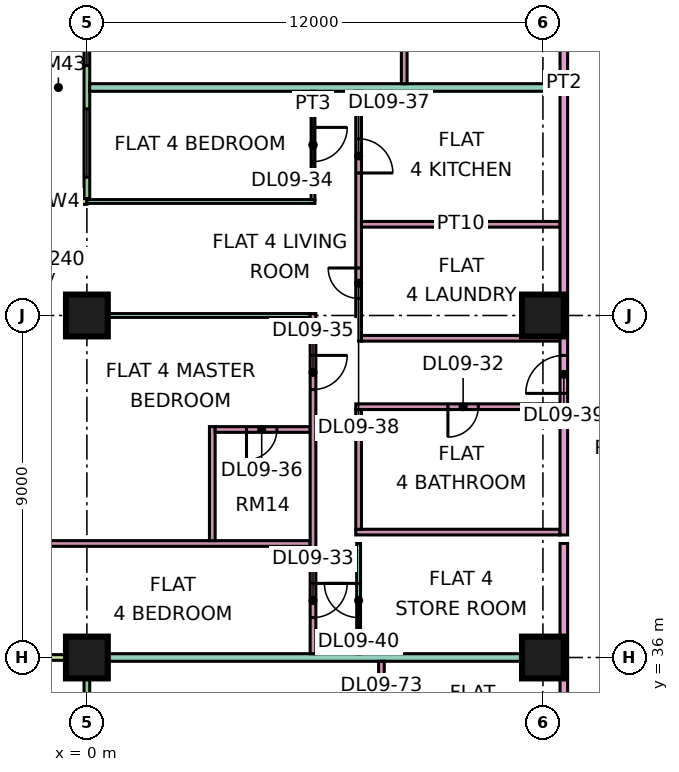
"""IFC4 building model, lengths in metres.
Left out: names, types, materials, properties, quantities, classifications, styles, units other than length and angle.
Written with IfcOpenShell. Run it as: python <this file> out.ifc"""

import sys

from ifc_helpers import new_model, si_unit, direction, frame, frame_2d, origin, origin_2d, place, context, subcontext, project, spatial, rectangle, extrude, element, fill, save


model = new_model("IFC4")
c1 = context("Model", 3, precision=1e-05, world=origin(), true_north=direction((0.0, 1.0)))
c2 = subcontext(c1, "Body", "Model", "MODEL_VIEW")
j1 = project(units=[si_unit("LENGTHUNIT", "METRE"), si_unit("PLANEANGLEUNIT", "RADIAN")], contexts=[c1])
p1 = place(None, origin())
s1 = spatial("IfcSite", under=j1, at=p1, CompositionType="ELEMENT")
p2 = place(p1, origin())
s2 = spatial("IfcBuilding", under=s1, at=p2, CompositionType="ELEMENT")
p3 = place(p2, frame((0.0, 0.0, 48.9)))
s3 = spatial("IfcBuildingStorey", under=s2, at=p3, CompositionType="ELEMENT", Elevation=48.9)
p4 = place(p3, frame((0.0, 36.0, 0.0), z_axis=(0.0, 0.0, 1.0), x_axis=(1.0, 0.0, 0.0)))
e1 = element("IfcColumn", 1, at=p4, inside=s3, PredefinedType="COLUMN", context=c2, shape_type="SweptSolid", body=[
    extrude(rectangle(XDim=1.1, YDim=1.1, at=origin_2d()), origin(), (0.0, 0.0, 1.0), 3.75),
])
p5 = place(p3, frame((0.0, 45.0, 0.0), z_axis=(0.0, 0.0, 1.0), x_axis=(1.0, 0.0, 0.0)))
e2 = element("IfcColumn", 2, at=p5, inside=s3, PredefinedType="COLUMN", context=c2, shape_type="SweptSolid", body=[
    extrude(rectangle(XDim=1.1, YDim=1.1, at=origin_2d()), origin(), (0.0, 0.0, 1.0), 3.75),
])
for number, where, z_axis, x_axis in (
    (3, (12.0, 36.0, 0.0), (0.0, 0.0, 1.0), (1.0, 0.0, 0.0)),
    (4, (12.0, 45.0, 0.0), (0.0, 0.0, 1.0), (1.0, 0.0, 0.0)),
):
    element("IfcColumn", number, at=place(p3, frame(where, z_axis=z_axis, x_axis=x_axis)), inside=s3, PredefinedType="COLUMN", context=c2, shape_type="SweptSolid", body=[
        extrude(rectangle(XDim=1.1, YDim=1.1, at=origin_2d()), origin(), (0.0, 0.0, 1.0), 3.75),
    ])
p6 = place(p3, frame((0.0, 61.425, 0.0), z_axis=(0.0, 0.0, 1.0), x_axis=(0.0, -1.0, 0.0)))
e5 = element("IfcWall", 5, at=p6, inside=s3, PredefinedType="SOLIDWALL", context=c2, shape_type="SweptSolid", body=[
    extrude(rectangle(XDim=13.35, YDim=0.15, at=frame_2d((6.675, 0.0))), origin(), (0.0, 0.0, 1.0), 3.35),
])
p7 = place(p6, frame((1.312, 0.0, 0.0)))
e6 = element("IfcOpeningElement", 6, at=p7, cuts=e5, PredefinedType="OPENING", context=c2, shape_type="SweptSolid", body=[
    extrude(rectangle(XDim=1.8, YDim=2.4, at=frame_2d((0.9, 1.2))), frame((0.0, 0.085, 0.0), z_axis=(0.0, -1.0, 0.0), x_axis=(1.0, 0.0, 0.0)), (0.0, 0.0, 1.0), 0.17),
])
p8 = place(p6, frame((5.0, 0.0, 0.45)))
e7 = element("IfcOpeningElement", 7, at=p8, cuts=e5, PredefinedType="OPENING", context=c2, shape_type="SweptSolid", body=[
    extrude(rectangle(XDim=1.2, YDim=2.4, at=frame_2d((0.6, 1.2))), frame((0.0, 0.085, 0.0), z_axis=(0.0, -1.0, 0.0), x_axis=(1.0, 0.0, 0.0)), (0.0, 0.0, 1.0), 0.17),
])
p9 = place(p6, frame((8.65, 0.0, 0.45)))
e8 = element("IfcOpeningElement", 8, at=p9, cuts=e5, PredefinedType="OPENING", context=c2, shape_type="SweptSolid", body=[
    extrude(rectangle(XDim=1.2, YDim=2.4, at=frame_2d((0.6, 1.2))), frame((0.0, 0.085, 0.0), z_axis=(0.0, -1.0, 0.0), x_axis=(1.0, 0.0, 0.0)), (0.0, 0.0, 1.0), 0.17),
])
p10 = place(p6, frame((10.988, 0.0, 0.45)))
e9 = element("IfcOpeningElement", 9, at=p10, cuts=e5, PredefinedType="OPENING", context=c2, shape_type="SweptSolid", body=[
    extrude(rectangle(XDim=1.8, YDim=2.4, at=frame_2d((0.9, 1.2))), frame((0.0, 0.085, 0.0), z_axis=(0.0, -1.0, 0.0), x_axis=(1.0, 0.0, 0.0)), (0.0, 0.0, 1.0), 0.17),
])
p11 = place(p3, frame((-1.5, 48.0, 0.0), z_axis=(0.0, 0.0, 1.0), x_axis=(1.0, 0.0, 0.0)))
e10 = element("IfcWall", 10, at=p11, inside=s3, PredefinedType="SOLIDWALL", context=c2, shape_type="SweptSolid", body=[
    extrude(rectangle(XDim=1.5, YDim=0.15, at=frame_2d((0.75, 0.0))), origin(), (0.0, 0.0, 1.0), 3.35),
])
p12 = place(p3, frame((0.0, 35.925, 0.0), z_axis=(0.0, 0.0, 1.0), x_axis=(0.0, -1.0, 0.0)))
e11 = element("IfcWall", 11, at=p12, inside=s3, PredefinedType="SOLIDWALL", context=c2, shape_type="SweptSolid", body=[
    extrude(rectangle(XDim=11.85, YDim=0.15, at=frame_2d((5.925, 0.0))), origin(), (0.0, 0.0, 1.0), 3.35),
])
p13 = place(p12, frame((1.15, 0.0, 0.45)))
e12 = element("IfcOpeningElement", 12, at=p13, cuts=e11, PredefinedType="OPENING", context=c2, shape_type="SweptSolid", body=[
    extrude(rectangle(XDim=1.2, YDim=2.4, at=frame_2d((0.6, 1.2))), frame((0.0, 0.085, 0.0), z_axis=(0.0, -1.0, 0.0), x_axis=(1.0, 0.0, 0.0)), (0.0, 0.0, 1.0), 0.17),
])
p14 = place(p12, frame((5.025, 0.0, 0.0)))
e13 = element("IfcOpeningElement", 13, at=p14, cuts=e11, PredefinedType="OPENING", context=c2, shape_type="SweptSolid", body=[
    extrude(rectangle(XDim=1.8, YDim=2.4, at=frame_2d((0.9, 1.2))), frame((0.0, 0.085, 0.0), z_axis=(0.0, -1.0, 0.0), x_axis=(1.0, 0.0, 0.0)), (0.0, 0.0, 1.0), 0.17),
])
p15 = place(p12, frame((9.5, 0.0, 0.45)))
e14 = element("IfcOpeningElement", 14, at=p15, cuts=e11, PredefinedType="OPENING", context=c2, shape_type="SweptSolid", body=[
    extrude(rectangle(XDim=1.2, YDim=2.4, at=frame_2d((0.6, 1.2))), frame((0.0, 0.085, 0.0), z_axis=(0.0, -1.0, 0.0), x_axis=(1.0, 0.0, 0.0)), (0.0, 0.0, 1.0), 0.17),
])
p16 = place(p3, frame((-1.5, 36.0, 0.0), z_axis=(0.0, 0.0, 1.0), x_axis=(1.0, 0.0, 0.0)))
e15 = element("IfcWall", 15, at=p16, inside=s3, PredefinedType="SOLIDWALL", context=c2, shape_type="SweptSolid", body=[
    extrude(rectangle(XDim=1.5, YDim=0.15, at=frame_2d((0.75, 0.0))), origin(), (0.0, 0.0, 1.0), 3.35),
])
p17 = place(p3, frame((-1.351, 39.0, 0.0), z_axis=(0.0, 0.0, 1.0), x_axis=(1.0, 0.0, 0.0)))
e16 = element("IfcWall", 16, at=p17, inside=s3, PredefinedType="PARTITIONING", context=c2, shape_type="SweptSolid", body=[
    extrude(rectangle(XDim=7.226, YDim=0.15, at=frame_2d((3.613, 0.0))), origin(), (0.0, 0.0, 1.0), 3.35),
])
e17 = element("IfcWall", 17, at=p4, inside=s3, PredefinedType="PARTITIONING", context=c2, shape_type="SweptSolid", body=[
    extrude(rectangle(XDim=12.45, YDim=0.2, at=frame_2d((6.225, 0.0))), origin(), (0.0, 0.0, 1.0), 3.35),
])
e18 = element("IfcWall", 18, at=p5, inside=s3, PredefinedType="PARTITIONING", context=c2, shape_type="SweptSolid", body=[
    extrude(rectangle(XDim=5.875, YDim=0.1, at=frame_2d((2.938, 0.0))), origin(), (0.0, 0.0, 1.0), 3.35),
])
p18 = place(p3, frame((0.0, 48.0, 0.0), z_axis=(0.0, 0.0, 1.0), x_axis=(1.0, 0.0, 0.0)))
e19 = element("IfcWall", 19, at=p18, inside=s3, PredefinedType="PARTITIONING", context=c2, shape_type="SweptSolid", body=[
    extrude(rectangle(XDim=6.0, YDim=0.1, at=frame_2d((3.0, 0.0))), origin(), (0.0, 0.0, 1.0), 3.35),
])
p19 = place(p3, frame((0.074, 51.0, 0.0), z_axis=(0.0, 0.0, 1.0), x_axis=(1.0, 0.0, 0.0)))
e20 = element("IfcWall", 20, at=p19, inside=s3, PredefinedType="PARTITIONING", context=c2, shape_type="SweptSolid", body=[
    extrude(rectangle(XDim=12.376, YDim=0.2, at=frame_2d((6.188, 0.0))), origin(), (0.0, 0.0, 1.0), 3.35),
])
p20 = place(p3, frame((3.3, 39.075, 0.0), z_axis=(0.0, 0.0, 1.0), x_axis=(0.0, 1.0, 0.0)))
e21 = element("IfcWall", 21, at=p20, inside=s3, PredefinedType="PARTITIONING", context=c2, shape_type="SweptSolid", body=[
    extrude(rectangle(XDim=3.0, YDim=0.15, at=frame_2d((1.5, 0.0))), origin(), (0.0, 0.0, 1.0), 3.35),
])
p21 = place(p3, frame((3.375, 42.0, 0.0), z_axis=(0.0, 0.0, 1.0), x_axis=(1.0, 0.0, 0.0)))
e22 = element("IfcWall", 22, at=p21, inside=s3, PredefinedType="PARTITIONING", context=c2, shape_type="SweptSolid", body=[
    extrude(rectangle(XDim=2.5, YDim=0.15, at=frame_2d((1.25, 0.0))), origin(), (0.0, 0.0, 1.0), 3.35),
])
p22 = place(p21, frame((0.825, 0.0, 0.0)))
e23 = element("IfcOpeningElement", 23, at=p22, cuts=e22, PredefinedType="OPENING", context=c2, shape_type="SweptSolid", body=[
    extrude(rectangle(XDim=0.8, YDim=2.1, at=frame_2d((0.4, 1.05))), frame((0.0, 0.085, 0.0), z_axis=(0.0, -1.0, 0.0), x_axis=(1.0, 0.0, 0.0)), (0.0, 0.0, 1.0), 0.17),
])
p23 = place(p3, frame((5.95, 36.1, 0.0), z_axis=(0.0, 0.0, 1.0), x_axis=(0.0, 1.0, 0.0)))
e24 = element("IfcWall", 24, at=p23, inside=s3, PredefinedType="PARTITIONING", context=c2, shape_type="SweptSolid", body=[
    extrude(rectangle(XDim=8.95, YDim=0.15, at=frame_2d((4.475, 0.0))), origin(), (0.0, 0.0, 1.0), 3.35),
])
p24 = place(p23, frame((0.95, 0.0, 0.0)))
e25 = element("IfcOpeningElement", 25, at=p24, cuts=e24, PredefinedType="OPENING", context=c2, shape_type="SweptSolid", body=[
    extrude(rectangle(XDim=0.9, YDim=2.1, at=frame_2d((0.45, 1.05))), frame((0.0, 0.085, 0.0), z_axis=(0.0, -1.0, 0.0), x_axis=(1.0, 0.0, 0.0)), (0.0, 0.0, 1.0), 0.17),
])
p25 = place(p23, frame((6.95, 0.0, 0.0)))
e26 = element("IfcOpeningElement", 26, at=p25, cuts=e24, PredefinedType="OPENING", context=c2, shape_type="SweptSolid", body=[
    extrude(rectangle(XDim=0.9, YDim=2.1, at=frame_2d((0.45, 1.05))), frame((0.0, 0.085, 0.0), z_axis=(0.0, -1.0, 0.0), x_axis=(1.0, 0.0, 0.0)), (0.0, 0.0, 1.0), 0.17),
])
p26 = place(p3, frame((5.95, 48.05, 0.0), z_axis=(0.0, 0.0, 1.0), x_axis=(0.0, 1.0, 0.0)))
e27 = element("IfcWall", 27, at=p26, inside=s3, PredefinedType="PARTITIONING", context=c2, shape_type="SweptSolid", body=[
    extrude(rectangle(XDim=2.85, YDim=0.1, at=frame_2d((1.425, 0.0))), origin(), (0.0, 0.0, 1.0), 3.35),
])
p27 = place(p26, frame((1.0, 0.0, 0.0)))
e28 = element("IfcOpeningElement", 28, at=p27, cuts=e27, PredefinedType="OPENING", context=c2, shape_type="SweptSolid", body=[
    extrude(rectangle(XDim=0.9, YDim=2.1, at=frame_2d((0.45, 1.05))), frame((0.0, 0.06, 0.0), z_axis=(0.0, -1.0, 0.0), x_axis=(1.0, 0.0, 0.0)), (0.0, 0.0, 1.0), 0.12),
])
p28 = place(p3, frame((7.075, 39.3, 0.0), z_axis=(0.0, 0.0, 1.0), x_axis=(1.0, 0.0, 0.0)))
e29 = element("IfcWall", 29, at=p28, inside=s3, PredefinedType="PARTITIONING", context=c2, shape_type="SweptSolid", body=[
    extrude(rectangle(XDim=5.375, YDim=0.15, at=frame_2d((2.688, 0.0))), origin(), (0.0, 0.0, 1.0), 3.35),
])
p29 = place(p3, frame((7.075, 42.6, 0.0), z_axis=(0.0, 0.0, 1.0), x_axis=(1.0, 0.0, 0.0)))
e30 = element("IfcWall", 30, at=p29, inside=s3, PredefinedType="PARTITIONING", context=c2, shape_type="SweptSolid", body=[
    extrude(rectangle(XDim=5.375, YDim=0.15, at=frame_2d((2.688, 0.0))), origin(), (0.0, 0.0, 1.0), 3.35),
])
p30 = place(p29, frame((2.425, 0.0, 0.0)))
e31 = element("IfcOpeningElement", 31, at=p30, cuts=e30, PredefinedType="OPENING", context=c2, shape_type="SweptSolid", body=[
    extrude(rectangle(XDim=0.8, YDim=2.1, at=frame_2d((0.4, 1.05))), frame((0.0, 0.085, 0.0), z_axis=(0.0, -1.0, 0.0), x_axis=(1.0, 0.0, 0.0)), (0.0, 0.0, 1.0), 0.17),
])
p31 = place(p3, frame((7.15, 36.1, 0.0), z_axis=(0.0, 0.0, 1.0), x_axis=(0.0, 1.0, 0.0)))
e32 = element("IfcWall", 32, at=p31, inside=s3, PredefinedType="PARTITIONING", context=c2, shape_type="SweptSolid", body=[
    extrude(rectangle(XDim=2.9, YDim=0.1, at=frame_2d((1.45, 0.0))), origin(), (0.0, 0.0, 1.0), 3.35),
])
p32 = place(p31, frame((0.95, 0.0, 0.0)))
e33 = element("IfcOpeningElement", 33, at=p32, cuts=e32, PredefinedType="OPENING", context=c2, shape_type="SweptSolid", body=[
    extrude(rectangle(XDim=0.9, YDim=2.1, at=frame_2d((0.45, 1.05))), frame((0.0, 0.06, 0.0), z_axis=(0.0, -1.0, 0.0), x_axis=(1.0, 0.0, 0.0)), (0.0, 0.0, 1.0), 0.12),
])
p33 = place(p3, frame((7.15, 39.375, 0.0), z_axis=(0.0, 0.0, 1.0), x_axis=(0.0, 1.0, 0.0)))
e34 = element("IfcWall", 34, at=p33, inside=s3, PredefinedType="PARTITIONING", context=c2, shape_type="SweptSolid", body=[
    extrude(rectangle(XDim=3.15, YDim=0.15, at=frame_2d((1.575, 0.0))), origin(), (0.0, 0.0, 1.0), 3.35),
])
p34 = place(p3, frame((7.15, 44.325, 0.0), z_axis=(0.0, 0.0, 1.0), x_axis=(0.0, 1.0, 0.0)))
e35 = element("IfcWall", 35, at=p34, inside=s3, PredefinedType="PARTITIONING", context=c2, shape_type="SweptSolid", body=[
    extrude(rectangle(XDim=6.575, YDim=0.15, at=frame_2d((3.288, 0.0))), origin(), (0.0, 0.0, 1.0), 3.35),
])
p35 = place(p34, frame((4.425, 0.0, 0.0)))
e36 = element("IfcOpeningElement", 36, at=p35, cuts=e35, PredefinedType="OPENING", context=c2, shape_type="SweptSolid", body=[
    extrude(rectangle(XDim=0.9, YDim=2.1, at=frame_2d((0.45, 1.05))), frame((0.0, 0.085, 0.0), z_axis=(0.0, -1.0, 0.0), x_axis=(1.0, 0.0, 0.0)), (0.0, 0.0, 1.0), 0.17),
])
p36 = place(p34, frame((1.125, 0.0, 0.0)))
e37 = element("IfcOpeningElement", 37, at=p36, cuts=e35, PredefinedType="OPENING", context=c2, shape_type="SweptSolid", body=[
    extrude(rectangle(XDim=0.8, YDim=2.1, at=frame_2d((0.4, 1.05))), frame((0.0, 0.085, 0.0), z_axis=(0.0, -1.0, 0.0), x_axis=(1.0, 0.0, 0.0)), (0.0, 0.0, 1.0), 0.17),
])
for number, where, z_axis, x_axis in (
    (38, (7.225, 44.4, 0.0), (0.0, 0.0, 1.0), (1.0, 0.0, 0.0)),
    (39, (7.225, 47.4, 0.0), (0.0, 0.0, 1.0), (1.0, 0.0, 0.0)),
):
    element("IfcWall", number, at=place(p3, frame(where, z_axis=z_axis, x_axis=x_axis)), inside=s3, PredefinedType="PARTITIONING", context=c2, shape_type="SweptSolid", body=[
        extrude(rectangle(XDim=5.225, YDim=0.15, at=frame_2d((2.612, 0.0))), origin(), (0.0, 0.0, 1.0), 3.35),
    ])
p37 = place(p3, frame((7.75, 26.625, 0.0), z_axis=(0.0, 0.0, 1.0), x_axis=(0.0, 1.0, 0.0)))
e40 = element("IfcWall", 40, at=p37, inside=s3, PredefinedType="PARTITIONING", context=c2, shape_type="SweptSolid", body=[
    extrude(rectangle(XDim=9.275, YDim=0.15, at=frame_2d((4.637, 0.0))), origin(), (0.0, 0.0, 1.0), 3.35),
])
p38 = place(p37, frame((4.875, 0.0, 0.0)))
e41 = element("IfcOpeningElement", 41, at=p38, cuts=e40, PredefinedType="OPENING", context=c2, shape_type="SweptSolid", body=[
    extrude(rectangle(XDim=0.9, YDim=2.1, at=frame_2d((0.45, 1.05))), frame((0.0, 0.085, 0.0), z_axis=(0.0, -1.0, 0.0), x_axis=(1.0, 0.0, 0.0)), (0.0, 0.0, 1.0), 0.17),
])
p39 = place(p37, frame((7.575, 0.0, 0.0)))
e42 = element("IfcOpeningElement", 42, at=p39, cuts=e40, PredefinedType="OPENING", context=c2, shape_type="SweptSolid", body=[
    extrude(rectangle(XDim=0.9, YDim=2.1, at=frame_2d((0.45, 1.05))), frame((0.0, 0.085, 0.0), z_axis=(0.0, -1.0, 0.0), x_axis=(1.0, 0.0, 0.0)), (0.0, 0.0, 1.0), 0.17),
])
p40 = place(p3, frame((8.35, 51.1, 0.0), z_axis=(0.0, 0.0, 1.0), x_axis=(0.0, 1.0, 0.0)))
e43 = element("IfcWall", 43, at=p40, inside=s3, PredefinedType="PARTITIONING", context=c2, shape_type="SweptSolid", body=[
    extrude(rectangle(XDim=8.975, YDim=0.15, at=frame_2d((4.487, 0.0))), origin(), (0.0, 0.0, 1.0), 3.35),
])
p41 = place(p40, frame((6.95, 0.0, 0.0)))
e44 = element("IfcOpeningElement", 44, at=p41, cuts=e43, PredefinedType="OPENING", context=c2, shape_type="SweptSolid", body=[
    extrude(rectangle(XDim=0.8, YDim=2.1, at=frame_2d((0.4, 1.05))), frame((0.0, 0.085, 0.0), z_axis=(0.0, -1.0, 0.0), x_axis=(1.0, 0.0, 0.0)), (0.0, 0.0, 1.0), 0.17),
])
p42 = place(p40, frame((2.45, 0.0, 0.0)))
e45 = element("IfcOpeningElement", 45, at=p42, cuts=e43, PredefinedType="OPENING", context=c2, shape_type="SweptSolid", body=[
    extrude(rectangle(XDim=0.9, YDim=2.1, at=frame_2d((0.45, 1.05))), frame((0.0, 0.085, 0.0), z_axis=(0.0, -1.0, 0.0), x_axis=(1.0, 0.0, 0.0)), (0.0, 0.0, 1.0), 0.17),
])
p43 = place(p3, frame((12.55, 20.0, 0.0), z_axis=(0.0, 0.0, 1.0), x_axis=(0.0, 1.0, 0.0)))
e46 = element("IfcWall", 46, at=p43, inside=s3, PredefinedType="PARTITIONING", context=c2, shape_type="SweptSolid", body=[
    extrude(rectangle(XDim=19.0, YDim=0.2, at=frame_2d((9.5, 0.0))), origin(), (0.0, 0.0, 1.0), 3.35),
])
p44 = place(p43, frame((0.6, 0.0, 0.0)))
e47 = element("IfcOpeningElement", 47, at=p44, cuts=e46, PredefinedType="OPENING", context=c2, shape_type="SweptSolid", body=[
    extrude(rectangle(XDim=1.2, YDim=2.1, at=frame_2d((0.6, 1.05))), frame((0.0, 0.11, 0.0), z_axis=(0.0, -1.0, 0.0), x_axis=(1.0, 0.0, 0.0)), (0.0, 0.0, 1.0), 0.22),
])
p45 = place(p43, frame((4.65, 0.0, 0.0)))
e48 = element("IfcOpeningElement", 48, at=p45, cuts=e46, PredefinedType="OPENING", context=c2, shape_type="SweptSolid", body=[
    extrude(rectangle(XDim=1.0, YDim=2.1, at=frame_2d((0.5, 1.05))), frame((0.0, 0.11, 0.0), z_axis=(0.0, -1.0, 0.0), x_axis=(1.0, 0.0, 0.0)), (0.0, 0.0, 1.0), 0.22),
])
p46 = place(p3, frame((12.55, 39.225, 0.0), z_axis=(0.0, 0.0, 1.0), x_axis=(0.0, 1.0, 0.0)))
e49 = element("IfcWall", 49, at=p46, inside=s3, PredefinedType="PARTITIONING", context=c2, shape_type="SweptSolid", body=[
    extrude(rectangle(XDim=23.775, YDim=0.2, at=frame_2d((11.887, 0.0))), origin(), (0.0, 0.0, 1.0), 3.35),
])
p47 = place(p46, frame((3.725, 0.0, 0.0)))
e50 = element("IfcOpeningElement", 50, at=p47, cuts=e49, PredefinedType="OPENING", context=c2, shape_type="SweptSolid", body=[
    extrude(rectangle(XDim=1.0, YDim=2.1, at=frame_2d((0.5, 1.05))), frame((0.0, 0.11, 0.0), z_axis=(0.0, -1.0, 0.0), x_axis=(1.0, 0.0, 0.0)), (0.0, 0.0, 1.0), 0.22),
])
p48 = place(p46, frame((21.725, 0.0, 0.0)))
e51 = element("IfcOpeningElement", 51, at=p48, cuts=e49, PredefinedType="OPENING", context=c2, shape_type="SweptSolid", body=[
    extrude(rectangle(XDim=1.0, YDim=2.1, at=frame_2d((0.5, 1.05))), frame((0.0, 0.11, 0.0), z_axis=(0.0, -1.0, 0.0), x_axis=(1.0, 0.0, 0.0)), (0.0, 0.0, 1.0), 0.22),
])
p49 = place(p9, origin())
e52 = element("IfcWindow", 52, at=p49, inside=s3, PartitioningType="SINGLE_PANEL", PredefinedType="WINDOW", context=c2, shape_type="SweptSolid", body=[
    extrude(rectangle(XDim=1.2, YDim=2.4, at=frame_2d((0.6, 1.2))), frame((0.0, 0.03, 0.0), z_axis=(0.0, -1.0, 0.0), x_axis=(1.0, 0.0, 0.0)), (0.0, 0.0, 1.0), 0.06),
])
fill(e8, e52)
p50 = place(p10, origin())
e53 = element("IfcWindow", 53, at=p50, inside=s3, PartitioningType="SINGLE_PANEL", PredefinedType="WINDOW", context=c2, shape_type="SweptSolid", body=[
    extrude(rectangle(XDim=1.8, YDim=2.4, at=frame_2d((0.9, 1.2))), frame((0.0, 0.03, 0.0), z_axis=(0.0, -1.0, 0.0), x_axis=(1.0, 0.0, 0.0)), (0.0, 0.0, 1.0), 0.06),
])
fill(e9, e53)
p51 = place(p30, frame((0.8, 0.0, 0.0), z_axis=(0.0, 0.0, 1.0), x_axis=(-1.0, 0.0, 0.0)))
e54 = element("IfcDoor", 54, at=p51, inside=s3, OperationType="SINGLE_SWING_LEFT", PredefinedType="DOOR", context=c2, shape_type="SweptSolid", body=[
    extrude(rectangle(XDim=0.8, YDim=2.1, at=frame_2d((0.4, 1.05))), frame((0.0, 0.025, 0.0), z_axis=(0.0, -1.0, 0.0), x_axis=(1.0, 0.0, 0.0)), (0.0, 0.0, 1.0), 0.05),
])
fill(e31, e54)
p52 = place(p24, origin())
e55 = element("IfcDoor", 55, at=p52, inside=s3, OperationType="SINGLE_SWING_RIGHT", PredefinedType="DOOR", context=c2, shape_type="SweptSolid", body=[
    extrude(rectangle(XDim=0.9, YDim=2.1, at=frame_2d((0.45, 1.05))), frame((0.0, 0.025, 0.0), z_axis=(0.0, -1.0, 0.0), x_axis=(1.0, 0.0, 0.0)), (0.0, 0.0, 1.0), 0.05),
])
fill(e25, e55)
p53 = place(p27, origin())
e56 = element("IfcDoor", 56, at=p53, inside=s3, OperationType="SINGLE_SWING_RIGHT", PredefinedType="DOOR", context=c2, shape_type="SweptSolid", body=[
    extrude(rectangle(XDim=0.9, YDim=2.1, at=frame_2d((0.45, 1.05))), frame((0.0, 0.025, 0.0), z_axis=(0.0, -1.0, 0.0), x_axis=(1.0, 0.0, 0.0)), (0.0, 0.0, 1.0), 0.05),
])
fill(e28, e56)
p54 = place(p25, origin())
e57 = element("IfcDoor", 57, at=p54, inside=s3, OperationType="SINGLE_SWING_RIGHT", PredefinedType="DOOR", context=c2, shape_type="SweptSolid", body=[
    extrude(rectangle(XDim=0.9, YDim=2.1, at=frame_2d((0.45, 1.05))), frame((0.0, 0.025, 0.0), z_axis=(0.0, -1.0, 0.0), x_axis=(1.0, 0.0, 0.0)), (0.0, 0.0, 1.0), 0.05),
])
fill(e26, e57)
p55 = place(p22, frame((0.8, 0.0, 0.0), z_axis=(0.0, 0.0, 1.0), x_axis=(-1.0, 0.0, 0.0)))
e58 = element("IfcDoor", 58, at=p55, inside=s3, OperationType="SINGLE_SWING_LEFT", PredefinedType="DOOR", context=c2, shape_type="SweptSolid", body=[
    extrude(rectangle(XDim=0.8, YDim=2.1, at=frame_2d((0.4, 1.05))), frame((0.0, 0.025, 0.0), z_axis=(0.0, -1.0, 0.0), x_axis=(1.0, 0.0, 0.0)), (0.0, 0.0, 1.0), 0.05),
])
fill(e23, e58)
p56 = place(p35, frame((0.9, 0.0, 0.0), z_axis=(0.0, 0.0, 1.0), x_axis=(-1.0, 0.0, 0.0)))
e59 = element("IfcDoor", 59, at=p56, inside=s3, OperationType="SINGLE_SWING_LEFT", PredefinedType="DOOR", context=c2, shape_type="SweptSolid", body=[
    extrude(rectangle(XDim=0.9, YDim=2.1, at=frame_2d((0.45, 1.05))), frame((0.0, 0.025, 0.0), z_axis=(0.0, -1.0, 0.0), x_axis=(1.0, 0.0, 0.0)), (0.0, 0.0, 1.0), 0.05),
])
fill(e36, e59)
p57 = place(p36, frame((0.8, 0.0, 0.0), z_axis=(0.0, 0.0, 1.0), x_axis=(-1.0, 0.0, 0.0)))
e60 = element("IfcDoor", 60, at=p57, inside=s3, OperationType="SINGLE_SWING_RIGHT", PredefinedType="DOOR", context=c2, shape_type="SweptSolid", body=[
    extrude(rectangle(XDim=0.8, YDim=2.1, at=frame_2d((0.4, 1.05))), frame((0.0, 0.025, 0.0), z_axis=(0.0, -1.0, 0.0), x_axis=(1.0, 0.0, 0.0)), (0.0, 0.0, 1.0), 0.05),
])
fill(e37, e60)
p58 = place(p47, origin())
e61 = element("IfcDoor", 61, at=p58, inside=s3, OperationType="SINGLE_SWING_LEFT", PredefinedType="DOOR", context=c2, shape_type="SweptSolid", body=[
    extrude(rectangle(XDim=1.0, YDim=2.1, at=frame_2d((0.5, 1.05))), frame((0.0, 0.025, 0.0), z_axis=(0.0, -1.0, 0.0), x_axis=(1.0, 0.0, 0.0)), (0.0, 0.0, 1.0), 0.05),
])
fill(e50, e61)
p59 = place(p32, frame((0.9, 0.0, 0.0), z_axis=(0.0, 0.0, 1.0), x_axis=(-1.0, 0.0, 0.0)))
e62 = element("IfcDoor", 62, at=p59, inside=s3, OperationType="SINGLE_SWING_RIGHT", PredefinedType="DOOR", context=c2, shape_type="SweptSolid", body=[
    extrude(rectangle(XDim=0.9, YDim=2.1, at=frame_2d((0.45, 1.05))), frame((0.0, 0.025, 0.0), z_axis=(0.0, -1.0, 0.0), x_axis=(1.0, 0.0, 0.0)), (0.0, 0.0, 1.0), 0.05),
])
fill(e33, e62)
p60 = place(p39, frame((0.9, 0.0, 0.0), z_axis=(0.0, 0.0, 1.0), x_axis=(-1.0, 0.0, 0.0)))
e63 = element("IfcDoor", 63, at=p60, inside=s3, OperationType="SINGLE_SWING_LEFT", PredefinedType="DOOR", context=c2, shape_type="SweptSolid", body=[
    extrude(rectangle(XDim=0.9, YDim=2.1, at=frame_2d((0.45, 1.05))), frame((0.0, 0.025, 0.0), z_axis=(0.0, -1.0, 0.0), x_axis=(1.0, 0.0, 0.0)), (0.0, 0.0, 1.0), 0.05),
])
fill(e42, e63)
save(model, sys.argv[1])
